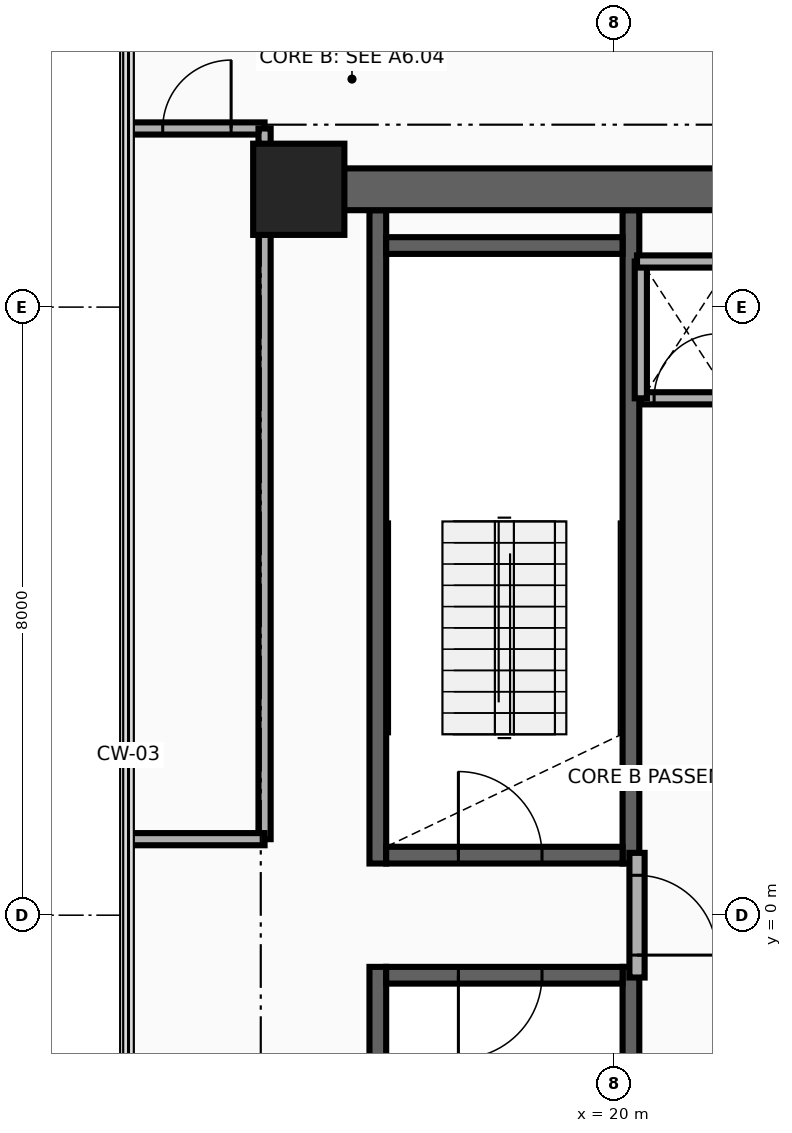
"""IFC4 building model, lengths in metres.
Left out: names, types, materials, properties, quantities, classifications, styles, units other than length and angle.
Written with IfcOpenShell. Run it as: python <this file> out.ifc"""

import sys

from ifc_helpers import new_model, si_unit, direction, frame, frame_2d, origin, origin_2d, place, context, subcontext, project, spatial, rectangle, extrude, source, transform, mapped, element, fill, save


model = new_model("IFC4")
c1 = context("Model", 3, precision=1e-05, world=origin(), true_north=direction((0.0, 1.0)))
c2 = subcontext(c1, "Body", "Model", "MODEL_VIEW")
j1 = project(units=[si_unit("LENGTHUNIT", "METRE"), si_unit("PLANEANGLEUNIT", "RADIAN")], contexts=[c1])
p1 = place(None, origin())
s1 = spatial("IfcSite", under=j1, at=p1, CompositionType="ELEMENT")
p2 = place(p1, origin())
s2 = spatial("IfcBuilding", under=s1, at=p2, CompositionType="ELEMENT")
p3 = place(p2, frame((0.0, 0.0, 157.5)))
s3 = spatial("IfcBuildingStorey", under=s2, at=p3, CompositionType="ELEMENT", Elevation=157.5)
for number, where, z_axis, x_axis in (
    (1, (16.89, 0.68, 0.0), (0.0, 0.0, 1.0), (0.0, 1.0, 0.0)),
    (2, (20.22, 0.68, 0.0), (0.0, 0.0, 1.0), (0.0, 1.0, 0.0)),
):
    element("IfcWall", number, at=place(p3, frame(where, z_axis=z_axis, x_axis=x_axis)), inside=s3, PredefinedType="SHEAR", context=c2, shape_type="SweptSolid", body=[
        extrude(rectangle(XDim=8.595, YDim=0.22, at=frame_2d((4.297, 0.0))), origin(), (0.0, 0.0, 1.0), 3.46),
    ])
p4 = place(p3, frame((17.0, 0.79, 0.0), z_axis=(0.0, 0.0, 1.0), x_axis=(1.0, 0.0, 0.0)))
e3 = element("IfcWall", 3, at=p4, inside=s3, PredefinedType="SHEAR", context=c2, shape_type="SweptSolid", body=[
    extrude(rectangle(XDim=3.11, YDim=0.22, at=frame_2d((1.555, 0.0))), origin(), (0.0, 0.0, 1.0), 3.46),
])
p5 = place(p4, frame((0.95, 0.0, 0.0)))
e4 = element("IfcOpeningElement", 4, at=p5, cuts=e3, PredefinedType="OPENING", context=c2, shape_type="SweptSolid", body=[
    extrude(rectangle(XDim=1.1, YDim=2.15, at=frame_2d((0.55, 1.075))), frame((0.0, 0.125, 0.0), z_axis=(0.0, -1.0, 0.0), x_axis=(1.0, 0.0, 0.0)), (0.0, 0.0, 1.0), 0.25),
])
p6 = place(p3, frame((17.0, 8.81, 0.0), z_axis=(0.0, 0.0, 1.0), x_axis=(1.0, 0.0, 0.0)))
e5 = element("IfcWall", 5, at=p6, inside=s3, PredefinedType="SHEAR", context=c2, shape_type="SweptSolid", body=[
    extrude(rectangle(XDim=3.11, YDim=0.22, at=frame_2d((1.555, 0.0))), origin(), (0.0, 0.0, 1.0), 3.46),
])
for number, where, z_axis, x_axis in (
    (6, (16.89, -9.275, 0.0), (0.0, 0.0, 1.0), (0.0, 1.0, 0.0)),
    (7, (20.22, -9.275, 0.0), (0.0, 0.0, 1.0), (0.0, 1.0, 0.0)),
):
    element("IfcWall", number, at=place(p3, frame(where, z_axis=z_axis, x_axis=x_axis)), inside=s3, PredefinedType="SHEAR", context=c2, shape_type="SweptSolid", body=[
        extrude(rectangle(XDim=8.595, YDim=0.22, at=frame_2d((4.297, 0.0))), origin(), (0.0, 0.0, 1.0), 3.46),
    ])
p7 = place(p3, frame((17.0, -0.79, 0.0), z_axis=(0.0, 0.0, 1.0), x_axis=(1.0, 0.0, 0.0)))
e8 = element("IfcWall", 8, at=p7, inside=s3, PredefinedType="SHEAR", context=c2, shape_type="SweptSolid", body=[
    extrude(rectangle(XDim=3.11, YDim=0.22, at=frame_2d((1.555, 0.0))), origin(), (0.0, 0.0, 1.0), 3.46),
])
p8 = place(p7, frame((0.95, 0.0, 0.0)))
e9 = element("IfcOpeningElement", 9, at=p8, cuts=e8, PredefinedType="OPENING", context=c2, shape_type="SweptSolid", body=[
    extrude(rectangle(XDim=1.1, YDim=2.15, at=frame_2d((0.55, 1.075))), frame((0.0, 0.125, 0.0), z_axis=(0.0, -1.0, 0.0), x_axis=(1.0, 0.0, 0.0)), (0.0, 0.0, 1.0), 0.25),
])
p9 = place(p3, frame((15.85, 9.55, 0.0), z_axis=(0.0, 0.0, 1.0), x_axis=(1.0, 0.0, 0.0)))
e10 = element("IfcWall", 10, at=p9, inside=s3, PredefinedType="SHEAR", context=c2, shape_type="SweptSolid", body=[
    extrude(rectangle(XDim=9.0, YDim=0.55, at=frame_2d((4.5, 0.0))), origin(), (0.0, 0.0, 1.0), 3.46),
])
m1 = source(origin(), c2, "Body", "SweptSolid", [
    extrude(rectangle(XDim=1.2, YDim=1.2, at=origin_2d()), origin(), (0.0, 0.0, 1.0), 3.7),
])
p10 = place(p3, frame((15.85, 9.55, 0.0), z_axis=(0.0, 0.0, 1.0), x_axis=(1.0, 0.0, 0.0)))
e11 = element("IfcColumn", 11, at=p10, inside=s3, PredefinedType="COLUMN", context=c2, shape_type="MappedRepresentation", body=[
    mapped(m1, transform((0.0, 0.0, 0.0), x_axis=(1.0, 0.0, 0.0), y_axis=(0.0, 1.0, 0.0), z_axis=(0.0, 0.0, 1.0), scale=1.0)),
])
p11 = place(p3, frame((20.3, -0.82, 0.0), z_axis=(0.0, 0.0, 1.0), x_axis=(0.0, 1.0, 0.0)))
e12 = element("IfcWall", 12, at=p11, inside=s3, PredefinedType="PARTITIONING", context=c2, shape_type="SweptSolid", body=[
    extrude(rectangle(XDim=1.64, YDim=0.2, at=frame_2d((0.82, 0.0))), origin(), (0.0, 0.0, 1.0), 3.46),
])
p12 = place(p11, frame((0.295, 0.0, 0.0)))
e13 = element("IfcOpeningElement", 13, at=p12, cuts=e12, PredefinedType="OPENING", context=c2, shape_type="SweptSolid", body=[
    extrude(rectangle(XDim=1.05, YDim=2.15, at=frame_2d((0.525, 1.075))), frame((0.0, 0.115, 0.0), z_axis=(0.0, -1.0, 0.0), x_axis=(1.0, 0.0, 0.0)), (0.0, 0.0, 1.0), 0.23),
])
p13 = place(p3, frame((20.35, 6.8, 0.0), z_axis=(0.0, 0.0, 1.0), x_axis=(1.0, 0.0, 0.0)))
e14 = element("IfcWall", 14, at=p13, inside=s3, PredefinedType="PARTITIONING", context=c2, shape_type="SweptSolid", body=[
    extrude(rectangle(XDim=1.2, YDim=0.16, at=frame_2d((0.6, 0.0))), origin(), (0.0, 0.0, 1.0), 3.46),
])
p14 = place(p13, frame((0.175, 0.0, 0.0)))
e15 = element("IfcOpeningElement", 15, at=p14, cuts=e14, PredefinedType="OPENING", context=c2, shape_type="SweptSolid", body=[
    extrude(rectangle(XDim=0.85, YDim=2.05, at=frame_2d((0.425, 1.025))), frame((0.0, 0.095, 0.0), z_axis=(0.0, -1.0, 0.0), x_axis=(1.0, 0.0, 0.0)), (0.0, 0.0, 1.0), 0.19),
])
p15 = place(p3, frame((20.35, 6.8, 0.0), z_axis=(0.0, 0.0, 1.0), x_axis=(0.0, 1.0, 0.0)))
e16 = element("IfcWall", 16, at=p15, inside=s3, PredefinedType="PARTITIONING", context=c2, shape_type="SweptSolid", body=[
    extrude(rectangle(XDim=1.8, YDim=0.16, at=frame_2d((0.9, 0.0))), origin(), (0.0, 0.0, 1.0), 3.46),
])
p16 = place(p3, frame((20.3, 8.6, 0.0), z_axis=(0.0, 0.0, 1.0), x_axis=(1.0, 0.0, 0.0)))
e17 = element("IfcWall", 17, at=p16, inside=s3, PredefinedType="PARTITIONING", context=c2, shape_type="SweptSolid", body=[
    extrude(rectangle(XDim=1.82, YDim=0.16, at=frame_2d((0.91, 0.0))), origin(), (0.0, 0.0, 1.0), 3.46),
])
p17 = place(p3, frame((13.61, 10.35, 0.0), z_axis=(0.0, 0.0, 1.0), x_axis=(1.0, 0.0, 0.0)))
e18 = element("IfcWall", 18, at=p17, inside=s3, PredefinedType="PARTITIONING", context=c2, shape_type="SweptSolid", body=[
    extrude(rectangle(XDim=1.79, YDim=0.16, at=frame_2d((0.895, 0.0))), origin(), (0.0, 0.0, 1.0), 3.46),
])
p18 = place(p17, frame((0.45, 0.0, 0.0)))
e19 = element("IfcOpeningElement", 19, at=p18, cuts=e18, PredefinedType="OPENING", context=c2, shape_type="SweptSolid", body=[
    extrude(rectangle(XDim=0.9, YDim=2.1, at=frame_2d((0.45, 1.05))), frame((0.0, 0.095, 0.0), z_axis=(0.0, -1.0, 0.0), x_axis=(1.0, 0.0, 0.0)), (0.0, 0.0, 1.0), 0.19),
])
p19 = place(p3, frame((15.4, 1.0, 0.0), z_axis=(0.0, 0.0, 1.0), x_axis=(0.0, 1.0, 0.0)))
e20 = element("IfcWall", 20, at=p19, inside=s3, PredefinedType="PARTITIONING", context=c2, shape_type="SweptSolid", body=[
    extrude(rectangle(XDim=9.35, YDim=0.16, at=frame_2d((4.675, 0.0))), origin(), (0.0, 0.0, 1.0), 3.46),
])
p20 = place(p3, frame((13.61, 1.0, 0.0), z_axis=(0.0, 0.0, 1.0), x_axis=(1.0, 0.0, 0.0)))
e21 = element("IfcWall", 21, at=p20, inside=s3, PredefinedType="PARTITIONING", context=c2, shape_type="SweptSolid", body=[
    extrude(rectangle(XDim=1.79, YDim=0.16, at=frame_2d((0.895, 0.0))), origin(), (0.0, 0.0, 1.0), 3.46),
])
p21 = place(p12, frame((1.05, 0.0, 0.0), z_axis=(0.0, 0.0, 1.0), x_axis=(-1.0, 0.0, 0.0)))
e22 = element("IfcDoor", 22, at=p21, inside=s3, OperationType="SINGLE_SWING_LEFT", PredefinedType="DOOR", context=c2, shape_type="SweptSolid", body=[
    extrude(rectangle(XDim=1.05, YDim=2.15, at=frame_2d((0.525, 1.075))), frame((0.0, 0.025, 0.0), z_axis=(0.0, -1.0, 0.0), x_axis=(1.0, 0.0, 0.0)), (0.0, 0.0, 1.0), 0.05),
])
fill(e13, e22)
p22 = place(p5, origin())
e23 = element("IfcDoor", 23, at=p22, inside=s3, OperationType="SINGLE_SWING_RIGHT", PredefinedType="DOOR", context=c2, shape_type="SweptSolid", body=[
    extrude(rectangle(XDim=1.1, YDim=2.15, at=frame_2d((0.55, 1.075))), frame((0.0, 0.025, 0.0), z_axis=(0.0, -1.0, 0.0), x_axis=(1.0, 0.0, 0.0)), (0.0, 0.0, 1.0), 0.05),
])
fill(e4, e23)
p23 = place(p8, frame((1.1, 0.0, 0.0), z_axis=(0.0, 0.0, 1.0), x_axis=(-1.0, 0.0, 0.0)))
e24 = element("IfcDoor", 24, at=p23, inside=s3, OperationType="SINGLE_SWING_LEFT", PredefinedType="DOOR", context=c2, shape_type="SweptSolid", body=[
    extrude(rectangle(XDim=1.1, YDim=2.15, at=frame_2d((0.55, 1.075))), frame((0.0, 0.025, 0.0), z_axis=(0.0, -1.0, 0.0), x_axis=(1.0, 0.0, 0.0)), (0.0, 0.0, 1.0), 0.05),
])
fill(e9, e24)
p24 = place(p14, origin())
e25 = element("IfcDoor", 25, at=p24, inside=s3, OperationType="SINGLE_SWING_RIGHT", PredefinedType="DOOR", context=c2, shape_type="SweptSolid", body=[
    extrude(rectangle(XDim=0.85, YDim=2.05, at=frame_2d((0.425, 1.025))), frame((0.0, 0.025, 0.0), z_axis=(0.0, -1.0, 0.0), x_axis=(1.0, 0.0, 0.0)), (0.0, 0.0, 1.0), 0.05),
])
fill(e15, e25)
p25 = place(p18, origin())
e26 = element("IfcDoor", 26, at=p25, inside=s3, OperationType="SINGLE_SWING_RIGHT", PredefinedType="DOOR", context=c2, shape_type="SweptSolid", body=[
    extrude(rectangle(XDim=0.9, YDim=2.1, at=frame_2d((0.45, 1.05))), frame((0.0, 0.025, 0.0), z_axis=(0.0, -1.0, 0.0), x_axis=(1.0, 0.0, 0.0)), (0.0, 0.0, 1.0), 0.05),
])
fill(e19, e26)
save(model, sys.argv[1])
